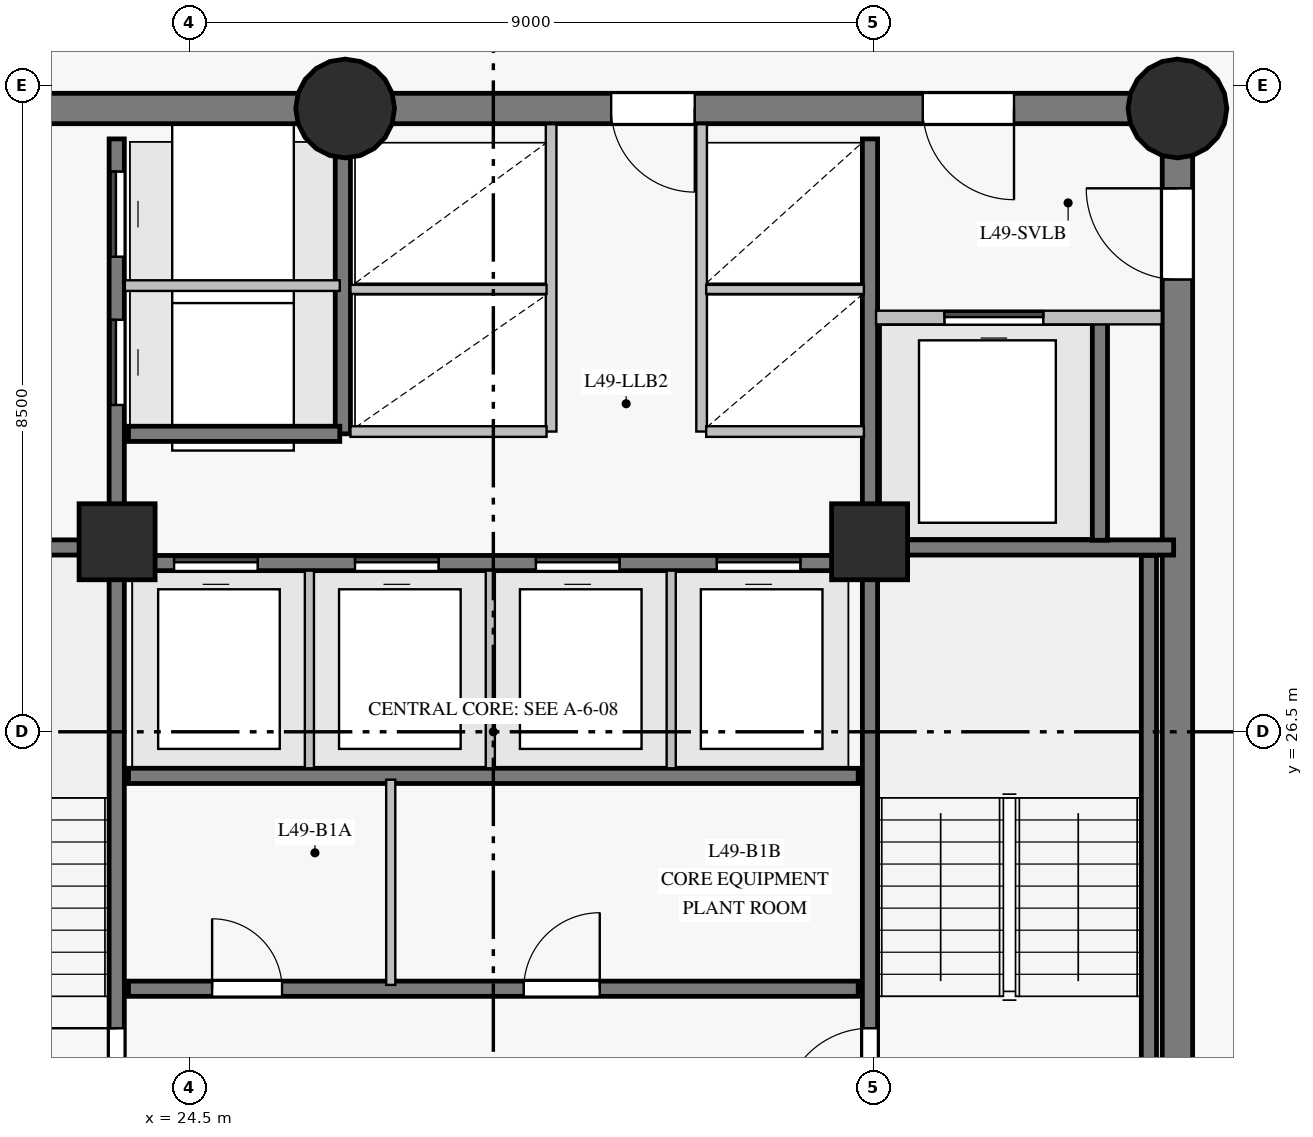
"""IFC4 building model, lengths in metres.
Left out: names, types, materials, properties, quantities, classifications, styles, units other than length and angle.
Written with IfcOpenShell. Run it as: python <this file> out.ifc"""

import sys

from ifc_helpers import new_model, si_unit, direction, frame, frame_2d, origin, origin_with_axes, origin_2d, place, context, subcontext, project, spatial, rectangle, circle, extrude, source, transform, mapped, element, fill, save


model = new_model("IFC4")
c1 = context("Model", 3, precision=1e-05, world=origin(), true_north=direction((0.0, 1.0)))
c2 = subcontext(c1, "Body", "Model", "MODEL_VIEW")
j1 = project(units=[si_unit("LENGTHUNIT", "METRE"), si_unit("PLANEANGLEUNIT", "RADIAN")], contexts=[c1])
p1 = place(None, origin())
s1 = spatial("IfcSite", under=j1, at=p1, CompositionType="ELEMENT")
p2 = place(p1, origin())
s2 = spatial("IfcBuilding", under=s1, at=p2, CompositionType="ELEMENT")
p3 = place(p2, frame((0.0, 0.0, 171.8)))
s3 = spatial("IfcBuildingStorey", under=s2, at=p3, CompositionType="ELEMENT", Elevation=171.8)
p4 = place(p3, frame((37.5, 18.3, 0.0), z_axis=(0.0, 0.0, 1.0), x_axis=(0.0, 1.0, 0.0)))
e1 = element("IfcWall", 1, at=p4, inside=s3, PredefinedType="SHEAR", context=c2, shape_type="SweptSolid", body=[
    extrude(rectangle(XDim=16.4, YDim=0.4, at=frame_2d((8.2, 0.0))), origin(), (0.0, 0.0, 1.0), 2.825),
])
p5 = place(p4, frame((14.15, 0.0, 0.0)))
e2 = element("IfcOpeningElement", 2, at=p5, cuts=e1, PredefinedType="OPENING", context=c2, shape_type="SweptSolid", body=[
    extrude(rectangle(XDim=1.2, YDim=2.15, at=frame_2d((0.6, 1.075))), frame((0.0, 0.21, 0.0), z_axis=(0.0, -1.0, 0.0), x_axis=(1.0, 0.0, 0.0)), (0.0, 0.0, 1.0), 0.42),
])
p6 = place(p3, frame((37.5, 34.7, 0.0), z_axis=(0.0, 0.0, 1.0), x_axis=(-1.0, 0.0, 0.0)))
e3 = element("IfcWall", 3, at=p6, inside=s3, PredefinedType="SHEAR", context=c2, shape_type="SweptSolid", body=[
    extrude(rectangle(XDim=10.95, YDim=0.4, at=frame_2d((5.475, 0.0))), origin(), (0.0, 0.0, 1.0), 2.825),
])
p7 = place(p6, frame((2.15, 0.0, 0.0)))
e4 = element("IfcOpeningElement", 4, at=p7, cuts=e3, PredefinedType="OPENING", context=c2, shape_type="SweptSolid", body=[
    extrude(rectangle(XDim=1.2, YDim=2.15, at=frame_2d((0.6, 1.075))), frame((0.0, 0.21, 0.0), z_axis=(0.0, -1.0, 0.0), x_axis=(1.0, 0.0, 0.0)), (0.0, 0.0, 1.0), 0.42),
])
p8 = place(p6, frame((6.35, 0.0, 0.0)))
e5 = element("IfcOpeningElement", 5, at=p8, cuts=e3, PredefinedType="OPENING", context=c2, shape_type="SweptSolid", body=[
    extrude(rectangle(XDim=1.1, YDim=2.15, at=frame_2d((0.55, 1.075))), frame((0.0, 0.21, 0.0), z_axis=(0.0, -1.0, 0.0), x_axis=(1.0, 0.0, 0.0)), (0.0, 0.0, 1.0), 0.42),
])
p9 = place(p3, frame((26.55, 34.7, 0.0), z_axis=(0.0, 0.0, 1.0), x_axis=(-1.0, 0.0, 0.0)))
e6 = element("IfcWall", 6, at=p9, inside=s3, PredefinedType="SHEAR", context=c2, shape_type="SweptSolid", body=[
    extrude(rectangle(XDim=7.05, YDim=0.4, at=frame_2d((3.525, 0.0))), origin(), (0.0, 0.0, 1.0), 2.825),
])
p10 = place(p9, frame((4.25, 0.0, 0.0)))
e7 = element("IfcOpeningElement", 7, at=p10, cuts=e6, PredefinedType="OPENING", context=c2, shape_type="SweptSolid", body=[
    extrude(rectangle(XDim=1.1, YDim=2.15, at=frame_2d((0.55, 1.075))), frame((0.0, 0.21, 0.0), z_axis=(0.0, -1.0, 0.0), x_axis=(1.0, 0.0, 0.0)), (0.0, 0.0, 1.0), 0.42),
])
m1 = source(origin_with_axes(), c2, "Body", "SweptSolid", [
    extrude(circle(Radius=0.65, at=origin_2d()), origin(), (0.0, 0.0, 1.0), 3.05),
])
for number, where, z_axis, x_axis in (
    (8, (26.55, 34.7, 0.0), (0.0, 0.0, 1.0), (1.0, 0.0, 0.0)),
    (9, (37.5, 34.7, 0.0), (0.0, 0.0, 1.0), (1.0, 0.0, 0.0)),
):
    element("IfcColumn", number, at=place(p3, frame(where, z_axis=z_axis, x_axis=x_axis)), inside=s3, PredefinedType="COLUMN", context=c2, shape_type="MappedRepresentation", body=[
        mapped(m1, transform((0.0, 0.0, 0.0), scale=1.0)),
    ])
m2 = source(origin_with_axes(), c2, "Body", "SweptSolid", [
    extrude(rectangle(XDim=1.0, YDim=1.0, at=origin_2d()), origin(), (0.0, 0.0, 1.0), 3.05),
])
for number, where, z_axis, x_axis in (
    (10, (23.55, 29.0, 0.0), (0.0, 0.0, 1.0), (1.0, 0.0, 0.0)),
    (11, (33.45, 29.0, 0.0), (0.0, 0.0, 1.0), (1.0, 0.0, 0.0)),
):
    element("IfcColumn", number, at=place(p3, frame(where, z_axis=z_axis, x_axis=x_axis)), inside=s3, PredefinedType="COLUMN", context=c2, shape_type="MappedRepresentation", body=[
        mapped(m2, transform((0.0, 0.0, 0.0), scale=1.0)),
    ])
p11 = place(p3, frame((23.545, 18.7, 0.0), z_axis=(0.0, 0.0, 1.0), x_axis=(0.0, 1.0, 0.0)))
e12 = element("IfcWall", 12, at=p11, inside=s3, PredefinedType="SHEAR", context=c2, shape_type="SweptSolid", body=[
    extrude(rectangle(XDim=15.6, YDim=0.2, at=frame_2d((7.8, 0.0))), origin(), (0.0, 0.0, 1.0), 2.825),
])
p12 = place(p11, frame((2.75, 0.0, 0.0)))
e13 = element("IfcOpeningElement", 13, at=p12, cuts=e12, PredefinedType="OPENING", context=c2, shape_type="SweptSolid", body=[
    extrude(rectangle(XDim=1.15, YDim=2.15, at=frame_2d((0.575, 1.075))), frame((0.0, 0.11, 0.0), z_axis=(0.0, -1.0, 0.0), x_axis=(1.0, 0.0, 0.0)), (0.0, 0.0, 1.0), 0.22),
])
p13 = place(p11, frame((0.14, 0.0, 0.0)))
e14 = element("IfcOpeningElement", 14, at=p13, cuts=e12, PredefinedType="OPENING", context=c2, shape_type="SweptSolid", body=[
    extrude(rectangle(XDim=0.88, YDim=2.1, at=frame_2d((0.44, 1.05))), frame((0.0, 0.11, 0.0), z_axis=(0.0, -1.0, 0.0), x_axis=(1.0, 0.0, 0.0)), (0.0, 0.0, 1.0), 0.22),
])
p14 = place(p11, frame((1.36, 0.0, 0.0)))
e15 = element("IfcOpeningElement", 15, at=p14, cuts=e12, PredefinedType="OPENING", context=c2, shape_type="SweptSolid", body=[
    extrude(rectangle(XDim=0.88, YDim=2.1, at=frame_2d((0.44, 1.05))), frame((0.0, 0.11, 0.0), z_axis=(0.0, -1.0, 0.0), x_axis=(1.0, 0.0, 0.0)), (0.0, 0.0, 1.0), 0.22),
])
p15 = place(p11, frame((12.1, 0.0, 0.0)))
e16 = element("IfcOpeningElement", 16, at=p15, cuts=e12, PredefinedType="OPENING", context=c2, shape_type="SweptSolid", body=[
    extrude(rectangle(XDim=1.12, YDim=2.15, at=frame_2d((0.56, 1.075))), frame((0.0, 0.11, 0.0), z_axis=(0.0, -1.0, 0.0), x_axis=(1.0, 0.0, 0.0)), (0.0, 0.0, 1.0), 0.22),
])
p16 = place(p11, frame((14.05, 0.0, 0.0)))
e17 = element("IfcOpeningElement", 17, at=p16, cuts=e12, PredefinedType="OPENING", context=c2, shape_type="SweptSolid", body=[
    extrude(rectangle(XDim=1.12, YDim=2.15, at=frame_2d((0.56, 1.075))), frame((0.0, 0.11, 0.0), z_axis=(0.0, -1.0, 0.0), x_axis=(1.0, 0.0, 0.0)), (0.0, 0.0, 1.0), 0.22),
])
p17 = place(p3, frame((33.455, 18.7, 0.0), z_axis=(0.0, 0.0, 1.0), x_axis=(0.0, 1.0, 0.0)))
e18 = element("IfcWall", 18, at=p17, inside=s3, PredefinedType="SHEAR", context=c2, shape_type="SweptSolid", body=[
    extrude(rectangle(XDim=15.6, YDim=0.2, at=frame_2d((7.8, 0.0))), origin(), (0.0, 0.0, 1.0), 2.825),
])
p18 = place(p17, frame((2.75, 0.0, 0.0)))
e19 = element("IfcOpeningElement", 19, at=p18, cuts=e18, PredefinedType="OPENING", context=c2, shape_type="SweptSolid", body=[
    extrude(rectangle(XDim=1.15, YDim=2.15, at=frame_2d((0.575, 1.075))), frame((0.0, 0.11, 0.0), z_axis=(0.0, -1.0, 0.0), x_axis=(1.0, 0.0, 0.0)), (0.0, 0.0, 1.0), 0.22),
])
p19 = place(p17, frame((0.55, 0.0, 0.0)))
e20 = element("IfcOpeningElement", 20, at=p19, cuts=e18, PredefinedType="OPENING", context=c2, shape_type="SweptSolid", body=[
    extrude(rectangle(XDim=0.94, YDim=2.1, at=frame_2d((0.47, 1.05))), frame((0.0, 0.11, 0.0), z_axis=(0.0, -1.0, 0.0), x_axis=(1.0, 0.0, 0.0)), (0.0, 0.0, 1.0), 0.22),
])
p20 = place(p3, frame((23.7, 23.12, 0.0), z_axis=(0.0, 0.0, 1.0), x_axis=(1.0, 0.0, 0.0)))
e21 = element("IfcWall", 21, at=p20, inside=s3, PredefinedType="SHEAR", context=c2, shape_type="SweptSolid", body=[
    extrude(rectangle(XDim=9.6, YDim=0.2, at=frame_2d((4.8, 0.0))), origin(), (0.0, 0.0, 1.0), 2.825),
])
p21 = place(p20, frame((1.1, 0.0, 0.0)))
e22 = element("IfcOpeningElement", 22, at=p21, cuts=e21, PredefinedType="OPENING", context=c2, shape_type="SweptSolid", body=[
    extrude(rectangle(XDim=0.92, YDim=2.1, at=frame_2d((0.46, 1.05))), frame((0.0, 0.11, 0.0), z_axis=(0.0, -1.0, 0.0), x_axis=(1.0, 0.0, 0.0)), (0.0, 0.0, 1.0), 0.22),
])
p22 = place(p20, frame((5.2, 0.0, 0.0)))
e23 = element("IfcOpeningElement", 23, at=p22, cuts=e21, PredefinedType="OPENING", context=c2, shape_type="SweptSolid", body=[
    extrude(rectangle(XDim=1.0, YDim=2.15, at=frame_2d((0.5, 1.075))), frame((0.0, 0.11, 0.0), z_axis=(0.0, -1.0, 0.0), x_axis=(1.0, 0.0, 0.0)), (0.0, 0.0, 1.0), 0.22),
])
p23 = place(p3, frame((23.7, 25.92, 0.0), z_axis=(0.0, 0.0, 1.0), x_axis=(1.0, 0.0, 0.0)))
e24 = element("IfcWall", 24, at=p23, inside=s3, PredefinedType="SHEAR", context=c2, shape_type="SweptSolid", body=[
    extrude(rectangle(XDim=9.6, YDim=0.2, at=frame_2d((4.8, 0.0))), origin(), (0.0, 0.0, 1.0), 2.825),
])
p24 = place(p3, frame((23.7, 28.72, 0.0), z_axis=(0.0, 0.0, 1.0), x_axis=(1.0, 0.0, 0.0)))
e25 = element("IfcWall", 25, at=p24, inside=s3, PredefinedType="SHEAR", context=c2, shape_type="SweptSolid", body=[
    extrude(rectangle(XDim=9.6, YDim=0.2, at=frame_2d((4.8, 0.0))), origin(), (0.0, 0.0, 1.0), 2.825),
])
p25 = place(p24, frame((0.6, 0.0, 0.0)))
e26 = element("IfcOpeningElement", 26, at=p25, cuts=e25, PredefinedType="OPENING", context=c2, shape_type="SweptSolid", body=[
    extrude(rectangle(XDim=1.1, YDim=2.15, at=frame_2d((0.55, 1.075))), frame((0.0, 0.11, 0.0), z_axis=(0.0, -1.0, 0.0), x_axis=(1.0, 0.0, 0.0)), (0.0, 0.0, 1.0), 0.22),
])
p26 = place(p24, frame((2.98, 0.0, 0.0)))
e27 = element("IfcOpeningElement", 27, at=p26, cuts=e25, PredefinedType="OPENING", context=c2, shape_type="SweptSolid", body=[
    extrude(rectangle(XDim=1.1, YDim=2.15, at=frame_2d((0.55, 1.075))), frame((0.0, 0.11, 0.0), z_axis=(0.0, -1.0, 0.0), x_axis=(1.0, 0.0, 0.0)), (0.0, 0.0, 1.0), 0.22),
])
p27 = place(p24, frame((5.36, 0.0, 0.0)))
e28 = element("IfcOpeningElement", 28, at=p27, cuts=e25, PredefinedType="OPENING", context=c2, shape_type="SweptSolid", body=[
    extrude(rectangle(XDim=1.1, YDim=2.15, at=frame_2d((0.55, 1.075))), frame((0.0, 0.11, 0.0), z_axis=(0.0, -1.0, 0.0), x_axis=(1.0, 0.0, 0.0)), (0.0, 0.0, 1.0), 0.22),
])
p28 = place(p24, frame((7.74, 0.0, 0.0)))
e29 = element("IfcOpeningElement", 29, at=p28, cuts=e25, PredefinedType="OPENING", context=c2, shape_type="SweptSolid", body=[
    extrude(rectangle(XDim=1.1, YDim=2.15, at=frame_2d((0.55, 1.075))), frame((0.0, 0.11, 0.0), z_axis=(0.0, -1.0, 0.0), x_axis=(1.0, 0.0, 0.0)), (0.0, 0.0, 1.0), 0.22),
])
p29 = place(p3, frame((37.125, 21.32, 0.0), z_axis=(0.0, 0.0, 1.0), x_axis=(0.0, 1.0, 0.0)))
e30 = element("IfcWall", 30, at=p29, inside=s3, PredefinedType="SHEAR", context=c2, shape_type="SweptSolid", body=[
    extrude(rectangle(XDim=7.5, YDim=0.2, at=frame_2d((3.75, 0.0))), origin(), (0.0, 0.0, 1.0), 2.825),
])
for number, where, z_axis, x_axis in (
    (31, (33.455, 28.925, 0.0), (0.0, 0.0, 1.0), (1.0, 0.0, 0.0)),
    (32, (19.55, 28.925, 0.0), (0.0, 0.0, 1.0), (1.0, 0.0, 0.0)),
):
    element("IfcWall", number, at=place(p3, frame(where, z_axis=z_axis, x_axis=x_axis)), inside=s3, PredefinedType="SHEAR", context=c2, shape_type="SweptSolid", body=[
        extrude(rectangle(XDim=3.995, YDim=0.2, at=frame_2d((1.998, 0.0))), origin(), (0.0, 0.0, 1.0), 2.825),
    ])
p30 = place(p3, frame((26.52, 30.42, 0.0), z_axis=(0.0, 0.0, 1.0), x_axis=(0.0, 1.0, 0.0)))
e33 = element("IfcWall", 33, at=p30, inside=s3, PredefinedType="SHEAR", context=c2, shape_type="SweptSolid", body=[
    extrude(rectangle(XDim=3.86, YDim=0.2, at=frame_2d((1.93, 0.0))), origin(), (0.0, 0.0, 1.0), 2.825),
])
p31 = place(p3, frame((36.48, 29.02, 0.0), z_axis=(0.0, 0.0, 1.0), x_axis=(0.0, 1.0, 0.0)))
e34 = element("IfcWall", 34, at=p31, inside=s3, PredefinedType="SHEAR", context=c2, shape_type="SweptSolid", body=[
    extrude(rectangle(XDim=2.86, YDim=0.2, at=frame_2d((1.43, 0.0))), origin(), (0.0, 0.0, 1.0), 2.825),
])
p32 = place(p3, frame((23.7, 30.42, 0.0), z_axis=(0.0, 0.0, 1.0), x_axis=(1.0, 0.0, 0.0)))
e35 = element("IfcWall", 35, at=p32, inside=s3, PredefinedType="SHEAR", context=c2, shape_type="SweptSolid", body=[
    extrude(rectangle(XDim=2.78, YDim=0.2, at=frame_2d((1.39, 0.0))), origin(), (0.0, 0.0, 1.0), 2.825),
])
for number, where, z_axis, x_axis in (
    (36, (29.26, 30.45, 0.0), (0.0, 0.0, 1.0), (0.0, 1.0, 0.0)),
    (37, (31.24, 30.45, 0.0), (0.0, 0.0, 1.0), (0.0, 1.0, 0.0)),
):
    element("IfcWall", number, at=place(p3, frame(where, z_axis=z_axis, x_axis=x_axis)), inside=s3, PredefinedType="PARTITIONING", context=c2, shape_type="SweptSolid", body=[
        extrude(rectangle(XDim=4.043, YDim=0.14, at=frame_2d((2.021, 0.0))), origin(), (0.0, 0.0, 1.0), 2.825),
    ])
p33 = place(p3, frame((33.535, 31.95, 0.0), z_axis=(0.0, 0.0, 1.0), x_axis=(1.0, 0.0, 0.0)))
e38 = element("IfcWall", 38, at=p33, inside=s3, PredefinedType="PARTITIONING", context=c2, shape_type="SweptSolid", body=[
    extrude(rectangle(XDim=3.759, YDim=0.18, at=frame_2d((1.879, 0.0))), origin(), (0.0, 0.0, 1.0), 2.825),
])
p34 = place(p33, frame((0.9, 0.0, 0.0)))
e39 = element("IfcOpeningElement", 39, at=p34, cuts=e38, PredefinedType="OPENING", context=c2, shape_type="SweptSolid", body=[
    extrude(rectangle(XDim=1.3, YDim=2.2, at=frame_2d((0.65, 1.1))), frame((0.0, 0.1, 0.0), z_axis=(0.0, -1.0, 0.0), x_axis=(1.0, 0.0, 0.0)), (0.0, 0.0, 1.0), 0.2),
])
p35 = place(p3, frame((23.652, 32.37, 0.0), z_axis=(0.0, 0.0, 1.0), x_axis=(1.0, 0.0, 0.0)))
e40 = element("IfcWall", 40, at=p35, inside=s3, PredefinedType="PARTITIONING", context=c2, shape_type="SweptSolid", body=[
    extrude(rectangle(XDim=2.828, YDim=0.14, at=frame_2d((1.414, 0.0))), origin(), (0.0, 0.0, 1.0), 2.825),
])
p36 = place(p3, frame((27.15, 23.17, 0.0), z_axis=(0.0, 0.0, 1.0), x_axis=(0.0, 1.0, 0.0)))
e41 = element("IfcWall", 41, at=p36, inside=s3, PredefinedType="PARTITIONING", context=c2, shape_type="SweptSolid", body=[
    extrude(rectangle(XDim=2.7, YDim=0.12, at=frame_2d((1.35, 0.0))), origin(), (0.0, 0.0, 1.0), 2.825),
])
for number, where, z_axis, x_axis in (
    (42, (26.08, 26.02, 0.0), (0.0, 0.0, 1.0), (0.0, 1.0, 0.0)),
    (43, (28.46, 26.02, 0.0), (0.0, 0.0, 1.0), (0.0, 1.0, 0.0)),
    (44, (30.84, 26.02, 0.0), (0.0, 0.0, 1.0), (0.0, 1.0, 0.0)),
):
    element("IfcWall", number, at=place(p3, frame(where, z_axis=z_axis, x_axis=x_axis)), inside=s3, PredefinedType="PARTITIONING", context=c2, shape_type="SweptSolid", body=[
        extrude(rectangle(XDim=2.6, YDim=0.12, at=frame_2d((1.3, 0.0))), origin(), (0.0, 0.0, 1.0), 2.825),
    ])
p37 = place(p3, frame((26.62, 30.45, 0.0), z_axis=(0.0, 0.0, 1.0), x_axis=(1.0, 0.0, 0.0)))
e45 = element("IfcWall", 45, at=p37, inside=s3, PredefinedType="PARTITIONING", context=c2, shape_type="SweptSolid", body=[
    extrude(rectangle(XDim=2.58, YDim=0.14, at=frame_2d((1.29, 0.0))), origin(), (0.0, 0.0, 1.0), 2.825),
])
p38 = place(p3, frame((26.62, 32.32, 0.0), z_axis=(0.0, 0.0, 1.0), x_axis=(1.0, 0.0, 0.0)))
e46 = element("IfcWall", 46, at=p38, inside=s3, PredefinedType="PARTITIONING", context=c2, shape_type="SweptSolid", body=[
    extrude(rectangle(XDim=2.58, YDim=0.12, at=frame_2d((1.29, 0.0))), origin(), (0.0, 0.0, 1.0), 2.825),
])
p39 = place(p3, frame((31.3, 30.45, 0.0), z_axis=(0.0, 0.0, 1.0), x_axis=(1.0, 0.0, 0.0)))
e47 = element("IfcWall", 47, at=p39, inside=s3, PredefinedType="PARTITIONING", context=c2, shape_type="SweptSolid", body=[
    extrude(rectangle(XDim=2.075, YDim=0.14, at=frame_2d((1.038, 0.0))), origin(), (0.0, 0.0, 1.0), 2.825),
])
p40 = place(p3, frame((31.3, 32.32, 0.0), z_axis=(0.0, 0.0, 1.0), x_axis=(1.0, 0.0, 0.0)))
e48 = element("IfcWall", 48, at=p40, inside=s3, PredefinedType="PARTITIONING", context=c2, shape_type="SweptSolid", body=[
    extrude(rectangle(XDim=2.075, YDim=0.12, at=frame_2d((1.038, 0.0))), origin(), (0.0, 0.0, 1.0), 2.825),
])
m3 = source(origin_with_axes(), c2, "Body", "SweptSolid", [
    extrude(rectangle(XDim=1.15, YDim=2.15, at=frame_2d((0.575, 1.075))), frame((0.0, 0.025, 0.0), z_axis=(0.0, -1.0, 0.0), x_axis=(1.0, 0.0, 0.0)), (0.0, 0.0, 1.0), 0.05),
])
p41 = place(p12, origin())
e49 = element("IfcDoor", 49, at=p41, inside=s3, OperationType="SINGLE_SWING_RIGHT", PredefinedType="DOOR", context=c2, shape_type="MappedRepresentation", body=[
    mapped(m3, transform((0.0, 0.0, 0.0), scale=1.0)),
])
fill(e13, e49)
p42 = place(p18, origin())
e50 = element("IfcDoor", 50, at=p42, inside=s3, OperationType="SINGLE_SWING_LEFT", PredefinedType="DOOR", context=c2, shape_type="MappedRepresentation", body=[
    mapped(m3, transform((0.0, 0.0, 0.0), scale=1.0)),
])
fill(e19, e50)
m4 = source(origin_with_axes(), c2, "Body", "SweptSolid", [
    extrude(rectangle(XDim=1.2, YDim=2.15, at=frame_2d((0.6, 1.075))), frame((0.0, 0.025, 0.0), z_axis=(0.0, -1.0, 0.0), x_axis=(1.0, 0.0, 0.0)), (0.0, 0.0, 1.0), 0.05),
])
p43 = place(p5, origin())
e51 = element("IfcDoor", 51, at=p43, inside=s3, OperationType="SINGLE_SWING_RIGHT", PredefinedType="DOOR", context=c2, shape_type="MappedRepresentation", body=[
    mapped(m4, transform((0.0, 0.0, 0.0), scale=1.0)),
])
fill(e2, e51)
p44 = place(p7, origin())
e52 = element("IfcDoor", 52, at=p44, inside=s3, OperationType="SINGLE_SWING_LEFT", PredefinedType="DOOR", context=c2, shape_type="MappedRepresentation", body=[
    mapped(m4, transform((0.0, 0.0, 0.0), scale=1.0)),
])
fill(e4, e52)
m5 = source(origin_with_axes(), c2, "Body", "SweptSolid", [
    extrude(rectangle(XDim=1.3, YDim=2.2, at=frame_2d((0.65, 1.1))), frame((0.0, 0.025, 0.0), z_axis=(0.0, -1.0, 0.0), x_axis=(1.0, 0.0, 0.0)), (0.0, 0.0, 1.0), 0.05),
])
p45 = place(p34, origin())
e53 = element("IfcDoor", 53, at=p45, inside=s3, OperationType="SLIDING_TO_LEFT", PredefinedType="DOOR", context=c2, shape_type="MappedRepresentation", body=[
    mapped(m5, transform((0.0, 0.0, 0.0), scale=1.0)),
])
fill(e39, e53)
m6 = source(origin_with_axes(), c2, "Body", "SweptSolid", [
    extrude(rectangle(XDim=0.92, YDim=2.1, at=frame_2d((0.46, 1.05))), frame((0.0, 0.025, 0.0), z_axis=(0.0, -1.0, 0.0), x_axis=(1.0, 0.0, 0.0)), (0.0, 0.0, 1.0), 0.05),
])
p46 = place(p21, origin())
e54 = element("IfcDoor", 54, at=p46, inside=s3, OperationType="SINGLE_SWING_LEFT", PredefinedType="DOOR", context=c2, shape_type="MappedRepresentation", body=[
    mapped(m6, transform((0.0, 0.0, 0.0), scale=1.0)),
])
fill(e22, e54)
m7 = source(origin_with_axes(), c2, "Body", "SweptSolid", [
    extrude(rectangle(XDim=1.0, YDim=2.15, at=frame_2d((0.5, 1.075))), frame((0.0, 0.025, 0.0), z_axis=(0.0, -1.0, 0.0), x_axis=(1.0, 0.0, 0.0)), (0.0, 0.0, 1.0), 0.05),
])
p47 = place(p22, origin())
e55 = element("IfcDoor", 55, at=p47, inside=s3, OperationType="SINGLE_SWING_RIGHT", PredefinedType="DOOR", context=c2, shape_type="MappedRepresentation", body=[
    mapped(m7, transform((0.0, 0.0, 0.0), scale=1.0)),
])
fill(e23, e55)
m8 = source(origin_with_axes(), c2, "Body", "SweptSolid", [
    extrude(rectangle(XDim=1.1, YDim=2.15, at=frame_2d((0.55, 1.075))), frame((0.0, 0.025, 0.0), z_axis=(0.0, -1.0, 0.0), x_axis=(1.0, 0.0, 0.0)), (0.0, 0.0, 1.0), 0.05),
])
p48 = place(p25, origin())
e56 = element("IfcDoor", 56, at=p48, inside=s3, OperationType="SLIDING_TO_LEFT", PredefinedType="DOOR", context=c2, shape_type="MappedRepresentation", body=[
    mapped(m8, transform((0.0, 0.0, 0.0), scale=1.0)),
])
fill(e26, e56)
p49 = place(p26, origin())
e57 = element("IfcDoor", 57, at=p49, inside=s3, OperationType="SLIDING_TO_RIGHT", PredefinedType="DOOR", context=c2, shape_type="MappedRepresentation", body=[
    mapped(m8, transform((0.0, 0.0, 0.0), scale=1.0)),
])
fill(e27, e57)
p50 = place(p27, origin())
e58 = element("IfcDoor", 58, at=p50, inside=s3, OperationType="SLIDING_TO_LEFT", PredefinedType="DOOR", context=c2, shape_type="MappedRepresentation", body=[
    mapped(m8, transform((0.0, 0.0, 0.0), scale=1.0)),
])
fill(e28, e58)
p51 = place(p28, origin())
e59 = element("IfcDoor", 59, at=p51, inside=s3, OperationType="SLIDING_TO_RIGHT", PredefinedType="DOOR", context=c2, shape_type="MappedRepresentation", body=[
    mapped(m8, transform((0.0, 0.0, 0.0), scale=1.0)),
])
fill(e29, e59)
p52 = place(p8, origin())
e60 = element("IfcDoor", 60, at=p52, inside=s3, OperationType="SINGLE_SWING_LEFT", PredefinedType="DOOR", context=c2, shape_type="MappedRepresentation", body=[
    mapped(m8, transform((0.0, 0.0, 0.0), scale=1.0)),
])
fill(e5, e60)
m9 = source(origin_with_axes(), c2, "Body", "SweptSolid", [
    extrude(rectangle(XDim=1.12, YDim=2.15, at=frame_2d((0.56, 1.075))), frame((0.0, 0.025, 0.0), z_axis=(0.0, -1.0, 0.0), x_axis=(1.0, 0.0, 0.0)), (0.0, 0.0, 1.0), 0.05),
])
p53 = place(p15, origin())
e61 = element("IfcDoor", 61, at=p53, inside=s3, OperationType="SLIDING_TO_LEFT", PredefinedType="DOOR", context=c2, shape_type="MappedRepresentation", body=[
    mapped(m9, transform((0.0, 0.0, 0.0), scale=1.0)),
])
fill(e16, e61)
p54 = place(p16, origin())
e62 = element("IfcDoor", 62, at=p54, inside=s3, OperationType="SLIDING_TO_RIGHT", PredefinedType="DOOR", context=c2, shape_type="MappedRepresentation", body=[
    mapped(m9, transform((0.0, 0.0, 0.0), scale=1.0)),
])
fill(e17, e62)
save(model, sys.argv[1])
